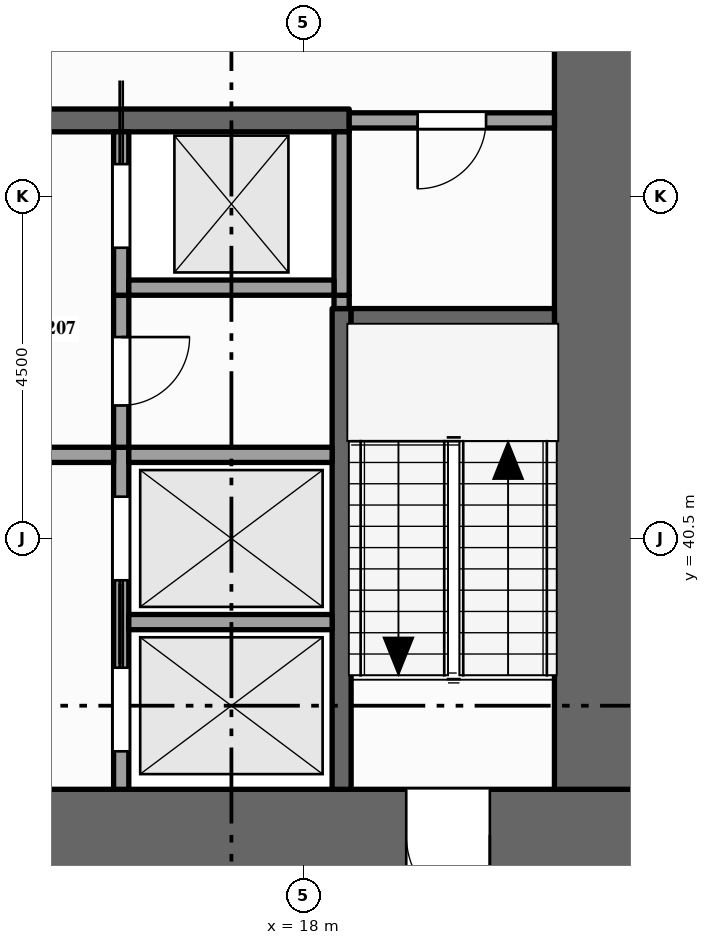
"""IFC4 building model, lengths in metres.
Left out: names, types, materials, properties, quantities, classifications, styles, units other than length and angle.
Written with IfcOpenShell. Run it as: python <this file> out.ifc"""

import sys

from ifc_helpers import new_model, si_unit, direction, frame, frame_2d, origin, place, context, subcontext, project, spatial, rectangle, extrude, element, fill, save


model = new_model("IFC4")
c1 = context("Model", 3, precision=1e-05, world=origin(), true_north=direction((0.0, 1.0)))
c2 = subcontext(c1, "Body", "Model", "MODEL_VIEW")
j1 = project(units=[si_unit("LENGTHUNIT", "METRE"), si_unit("PLANEANGLEUNIT", "RADIAN")], contexts=[c1])
p1 = place(None, origin())
s1 = spatial("IfcSite", under=j1, at=p1, CompositionType="ELEMENT")
p2 = place(p1, origin())
s2 = spatial("IfcBuilding", under=s1, at=p2, CompositionType="ELEMENT")
p3 = place(p2, frame((0.0, 0.0, 33.0)))
s3 = spatial("IfcBuildingStorey", under=s2, at=p3, CompositionType="ELEMENT", Elevation=33.0)
p4 = place(p3, frame((0.0, 36.6, -0.15), z_axis=(0.0, 0.0, 1.0), x_axis=(1.0, 0.0, 0.0)))
e1 = element("IfcWall", 1, at=p4, inside=s3, PredefinedType="SHEAR", context=c2, shape_type="SweptSolid", body=[
    extrude(rectangle(XDim=22.5, YDim=1.2, at=frame_2d((11.25, 0.0))), origin(), (0.0, 0.0, 1.0), 4.0),
])
p5 = place(p4, frame((7.1, 0.0, 0.15)))
e2 = element("IfcOpeningElement", 2, at=p5, cuts=e1, PredefinedType="OPENING", context=c2, shape_type="SweptSolid", body=[
    extrude(rectangle(XDim=1.8, YDim=2.1, at=frame_2d((0.9, 1.05))), frame((0.0, 0.61, 0.0), z_axis=(0.0, -1.0, 0.0), x_axis=(1.0, 0.0, 0.0)), (0.0, 0.0, 1.0), 1.22),
])
p6 = place(p4, frame((13.15, 0.0, 0.15)))
e3 = element("IfcOpeningElement", 3, at=p6, cuts=e1, PredefinedType="OPENING", context=c2, shape_type="SweptSolid", body=[
    extrude(rectangle(XDim=1.1, YDim=2.1, at=frame_2d((0.55, 1.05))), frame((0.0, 0.61, 0.0), z_axis=(0.0, -1.0, 0.0), x_axis=(1.0, 0.0, 0.0)), (0.0, 0.0, 1.0), 1.22),
])
p7 = place(p4, frame((2.15, 0.0, 0.15)))
e4 = element("IfcOpeningElement", 4, at=p7, cuts=e1, PredefinedType="OPENING", context=c2, shape_type="SweptSolid", body=[
    extrude(rectangle(XDim=1.1, YDim=2.1, at=frame_2d((0.55, 1.05))), frame((0.0, 0.61, 0.0), z_axis=(0.0, -1.0, 0.0), x_axis=(1.0, 0.0, 0.0)), (0.0, 0.0, 1.0), 1.22),
])
p8 = place(p4, frame((19.35, 0.0, 0.15)))
e5 = element("IfcOpeningElement", 5, at=p8, cuts=e1, PredefinedType="OPENING", context=c2, shape_type="SweptSolid", body=[
    extrude(rectangle(XDim=1.1, YDim=2.1, at=frame_2d((0.55, 1.05))), frame((0.0, 0.61, 0.0), z_axis=(0.0, -1.0, 0.0), x_axis=(1.0, 0.0, 0.0)), (0.0, 0.0, 1.0), 1.22),
])
p9 = place(p3, frame((21.9, 37.2, -0.15), z_axis=(0.0, 0.0, 1.0), x_axis=(0.0, 1.0, 0.0)))
e6 = element("IfcWall", 6, at=p9, inside=s3, PredefinedType="SHEAR", context=c2, shape_type="SweptSolid", body=[
    extrude(rectangle(XDim=11.1, YDim=1.2, at=frame_2d((5.55, 0.0))), origin(), (0.0, 0.0, 1.0), 4.0),
])
p10 = place(p3, frame((15.6, 37.2, 0.0), z_axis=(0.0, 0.0, 1.0), x_axis=(0.0, 1.0, 0.0)))
e7 = element("IfcWall", 7, at=p10, inside=s3, PredefinedType="SOLIDWALL", context=c2, shape_type="SweptSolid", body=[
    extrude(rectangle(XDim=4.5, YDim=0.2, at=frame_2d((2.25, 0.0))), origin(), (0.0, 0.0, 1.0), 3.85),
])
p11 = place(p10, frame((0.5, 0.0, 0.012)))
e8 = element("IfcOpeningElement", 8, at=p11, cuts=e7, PredefinedType="OPENING", context=c2, shape_type="SweptSolid", body=[
    extrude(rectangle(XDim=1.1, YDim=2.1, at=frame_2d((0.55, 1.05))), frame((0.0, 0.11, 0.0), z_axis=(0.0, -1.0, 0.0), x_axis=(1.0, 0.0, 0.0)), (0.0, 0.0, 1.0), 0.22),
])
p12 = place(p10, frame((2.75, 0.0, 0.012)))
e9 = element("IfcOpeningElement", 9, at=p12, cuts=e7, PredefinedType="OPENING", context=c2, shape_type="SweptSolid", body=[
    extrude(rectangle(XDim=1.1, YDim=2.1, at=frame_2d((0.55, 1.05))), frame((0.0, 0.11, 0.0), z_axis=(0.0, -1.0, 0.0), x_axis=(1.0, 0.0, 0.0)), (0.0, 0.0, 1.0), 0.22),
])
p13 = place(p3, frame((15.6, 41.7, 0.0), z_axis=(0.0, 0.0, 1.0), x_axis=(0.0, 1.0, 0.0)))
e10 = element("IfcWall", 10, at=p13, inside=s3, PredefinedType="PARTITIONING", context=c2, shape_type="SweptSolid", body=[
    extrude(rectangle(XDim=2.0, YDim=0.2, at=frame_2d((1.0, 0.0))), origin(), (0.0, 0.0, 1.0), 3.85),
])
p14 = place(p13, frame((0.55, 0.0, 0.0)))
e11 = element("IfcOpeningElement", 11, at=p14, cuts=e10, PredefinedType="OPENING", context=c2, shape_type="SweptSolid", body=[
    extrude(rectangle(XDim=0.9, YDim=2.1, at=frame_2d((0.45, 1.05))), frame((0.0, 0.11, 0.0), z_axis=(0.0, -1.0, 0.0), x_axis=(1.0, 0.0, 0.0)), (0.0, 0.0, 1.0), 0.22),
])
p15 = place(p3, frame((15.6, 43.7, 0.0), z_axis=(0.0, 0.0, 1.0), x_axis=(0.0, 1.0, 0.0)))
e12 = element("IfcWall", 12, at=p15, inside=s3, PredefinedType="SOLIDWALL", context=c2, shape_type="SweptSolid", body=[
    extrude(rectangle(XDim=2.15, YDim=0.2, at=frame_2d((1.075, 0.0))), origin(), (0.0, 0.0, 1.0), 3.85),
])
p16 = place(p15, frame((0.625, 0.0, 0.012)))
e13 = element("IfcOpeningElement", 13, at=p16, cuts=e12, PredefinedType="OPENING", context=c2, shape_type="SweptSolid", body=[
    extrude(rectangle(XDim=1.1, YDim=2.1, at=frame_2d((0.55, 1.05))), frame((0.0, 0.11, 0.0), z_axis=(0.0, -1.0, 0.0), x_axis=(1.0, 0.0, 0.0)), (0.0, 0.0, 1.0), 0.22),
])
p17 = place(p3, frame((18.5, 37.2, 0.0), z_axis=(0.0, 0.0, 1.0), x_axis=(0.0, 1.0, 0.0)))
e14 = element("IfcWall", 14, at=p17, inside=s3, PredefinedType="SHEAR", context=c2, shape_type="SweptSolid", body=[
    extrude(rectangle(XDim=6.325, YDim=0.25, at=frame_2d((3.163, 0.0))), origin(), (0.0, 0.0, 1.0), 3.85),
])
p18 = place(p3, frame((18.5, 43.525, 0.0), z_axis=(0.0, 0.0, 1.0), x_axis=(0.0, 1.0, 0.0)))
e15 = element("IfcWall", 15, at=p18, inside=s3, PredefinedType="PARTITIONING", context=c2, shape_type="SweptSolid", body=[
    extrude(rectangle(XDim=0.175, YDim=0.2, at=frame_2d((0.087, 0.0))), origin(), (0.0, 0.0, 1.0), 3.85),
])
p19 = place(p3, frame((18.5, 43.7, 0.0), z_axis=(0.0, 0.0, 1.0), x_axis=(0.0, 1.0, 0.0)))
e16 = element("IfcWall", 16, at=p19, inside=s3, PredefinedType="SOLIDWALL", context=c2, shape_type="SweptSolid", body=[
    extrude(rectangle(XDim=2.15, YDim=0.2, at=frame_2d((1.075, 0.0))), origin(), (0.0, 0.0, 1.0), 3.85),
])
p20 = place(p3, frame((15.7, 39.4, 0.0), z_axis=(0.0, 0.0, 1.0), x_axis=(1.0, 0.0, 0.0)))
e17 = element("IfcWall", 17, at=p20, inside=s3, PredefinedType="SOLIDWALL", context=c2, shape_type="SweptSolid", body=[
    extrude(rectangle(XDim=2.675, YDim=0.2, at=frame_2d((1.337, 0.0))), origin(), (0.0, 0.0, 1.0), 3.85),
])
p21 = place(p3, frame((11.9, 41.6, 0.0), z_axis=(0.0, 0.0, 1.0), x_axis=(1.0, 0.0, 0.0)))
e18 = element("IfcWall", 18, at=p21, inside=s3, PredefinedType="PARTITIONING", context=c2, shape_type="SweptSolid", body=[
    extrude(rectangle(XDim=3.6, YDim=0.2, at=frame_2d((1.8, 0.0))), origin(), (0.0, 0.0, 1.0), 3.85),
])
p22 = place(p21, frame((1.3, 0.0, 0.0)))
e19 = element("IfcOpeningElement", 19, at=p22, cuts=e18, PredefinedType="OPENING", context=c2, shape_type="SweptSolid", body=[
    extrude(rectangle(XDim=1.0, YDim=2.1, at=frame_2d((0.5, 1.05))), frame((0.0, 0.11, 0.0), z_axis=(0.0, -1.0, 0.0), x_axis=(1.0, 0.0, 0.0)), (0.0, 0.0, 1.0), 0.22),
])
p23 = place(p3, frame((15.7, 41.6, 0.0), z_axis=(0.0, 0.0, 1.0), x_axis=(1.0, 0.0, 0.0)))
e20 = element("IfcWall", 20, at=p23, inside=s3, PredefinedType="SOLIDWALL", context=c2, shape_type="SweptSolid", body=[
    extrude(rectangle(XDim=2.675, YDim=0.2, at=frame_2d((1.337, 0.0))), origin(), (0.0, 0.0, 1.0), 3.85),
])
p24 = place(p3, frame((18.625, 43.4, 0.0), z_axis=(0.0, 0.0, 1.0), x_axis=(1.0, 0.0, 0.0)))
e21 = element("IfcWall", 21, at=p24, inside=s3, PredefinedType="SHEAR", context=c2, shape_type="SweptSolid", body=[
    extrude(rectangle(XDim=2.675, YDim=0.25, at=frame_2d((1.337, 0.0))), origin(), (0.0, 0.0, 1.0), 3.85),
])
p25 = place(p3, frame((15.7, 43.8, 0.0), z_axis=(0.0, 0.0, 1.0), x_axis=(1.0, 0.0, 0.0)))
e22 = element("IfcWall", 22, at=p25, inside=s3, PredefinedType="SOLIDWALL", context=c2, shape_type="SweptSolid", body=[
    extrude(rectangle(XDim=2.7, YDim=0.2, at=frame_2d((1.35, 0.0))), origin(), (0.0, 0.0, 1.0), 3.85),
])
p26 = place(p3, frame((4.1, 46.0, 0.0), z_axis=(0.0, 0.0, 1.0), x_axis=(1.0, 0.0, 0.0)))
e23 = element("IfcWall", 23, at=p26, inside=s3, PredefinedType="SHEAR", context=c2, shape_type="SweptSolid", body=[
    extrude(rectangle(XDim=14.5, YDim=0.3, at=frame_2d((7.25, 0.0))), origin(), (0.0, 0.0, 1.0), 3.85),
])
p27 = place(p26, frame((3.4, 0.0, 0.0)))
e24 = element("IfcOpeningElement", 24, at=p27, cuts=e23, PredefinedType="OPENING", context=c2, shape_type="SweptSolid", body=[
    extrude(rectangle(XDim=1.0, YDim=2.1, at=frame_2d((0.5, 1.05))), frame((0.0, 0.16, 0.0), z_axis=(0.0, -1.0, 0.0), x_axis=(1.0, 0.0, 0.0)), (0.0, 0.0, 1.0), 0.32),
])
p28 = place(p26, frame((9.1, 0.0, 0.0)))
e25 = element("IfcOpeningElement", 25, at=p28, cuts=e23, PredefinedType="OPENING", context=c2, shape_type="SweptSolid", body=[
    extrude(rectangle(XDim=1.0, YDim=2.1, at=frame_2d((0.5, 1.05))), frame((0.0, 0.16, 0.0), z_axis=(0.0, -1.0, 0.0), x_axis=(1.0, 0.0, 0.0)), (0.0, 0.0, 1.0), 0.32),
])
p29 = place(p3, frame((18.6, 46.0, 0.0), z_axis=(0.0, 0.0, 1.0), x_axis=(1.0, 0.0, 0.0)))
e26 = element("IfcWall", 26, at=p29, inside=s3, PredefinedType="PARTITIONING", context=c2, shape_type="SweptSolid", body=[
    extrude(rectangle(XDim=2.7, YDim=0.2, at=frame_2d((1.35, 0.0))), origin(), (0.0, 0.0, 1.0), 3.85),
])
p30 = place(p29, frame((0.9, 0.0, 0.0)))
e27 = element("IfcOpeningElement", 27, at=p30, cuts=e26, PredefinedType="OPENING", context=c2, shape_type="SweptSolid", body=[
    extrude(rectangle(XDim=0.9, YDim=2.1, at=frame_2d((0.45, 1.05))), frame((0.0, 0.11, 0.0), z_axis=(0.0, -1.0, 0.0), x_axis=(1.0, 0.0, 0.0)), (0.0, 0.0, 1.0), 0.22),
])
p31 = place(p11, origin())
e28 = element("IfcDoor", 28, at=p31, inside=s3, OperationType="SLIDING_TO_RIGHT", PredefinedType="DOOR", context=c2, shape_type="SweptSolid", body=[
    extrude(rectangle(XDim=1.1, YDim=2.1, at=frame_2d((0.55, 1.05))), frame((0.0, 0.025, 0.0), z_axis=(0.0, -1.0, 0.0), x_axis=(1.0, 0.0, 0.0)), (0.0, 0.0, 1.0), 0.05),
])
fill(e8, e28)
p32 = place(p12, origin())
e29 = element("IfcDoor", 29, at=p32, inside=s3, OperationType="SLIDING_TO_LEFT", PredefinedType="DOOR", context=c2, shape_type="SweptSolid", body=[
    extrude(rectangle(XDim=1.1, YDim=2.1, at=frame_2d((0.55, 1.05))), frame((0.0, 0.025, 0.0), z_axis=(0.0, -1.0, 0.0), x_axis=(1.0, 0.0, 0.0)), (0.0, 0.0, 1.0), 0.05),
])
fill(e9, e29)
p33 = place(p16, origin())
e30 = element("IfcDoor", 30, at=p33, inside=s3, OperationType="SLIDING_TO_RIGHT", PredefinedType="DOOR", context=c2, shape_type="SweptSolid", body=[
    extrude(rectangle(XDim=1.1, YDim=2.1, at=frame_2d((0.55, 1.05))), frame((0.0, 0.025, 0.0), z_axis=(0.0, -1.0, 0.0), x_axis=(1.0, 0.0, 0.0)), (0.0, 0.0, 1.0), 0.05),
])
fill(e13, e30)
p34 = place(p8, origin())
e31 = element("IfcDoor", 31, at=p34, inside=s3, OperationType="SINGLE_SWING_RIGHT", PredefinedType="DOOR", context=c2, shape_type="SweptSolid", body=[
    extrude(rectangle(XDim=1.1, YDim=2.1, at=frame_2d((0.55, 1.05))), frame((0.0, 0.025, 0.0), z_axis=(0.0, -1.0, 0.0), x_axis=(1.0, 0.0, 0.0)), (0.0, 0.0, 1.0), 0.05),
])
fill(e5, e31)
p35 = place(p30, origin())
e32 = element("IfcDoor", 32, at=p35, inside=s3, OperationType="SINGLE_SWING_LEFT", PredefinedType="DOOR", context=c2, shape_type="SweptSolid", body=[
    extrude(rectangle(XDim=0.9, YDim=2.1, at=frame_2d((0.45, 1.05))), frame((0.0, 0.025, 0.0), z_axis=(0.0, -1.0, 0.0), x_axis=(1.0, 0.0, 0.0)), (0.0, 0.0, 1.0), 0.05),
])
fill(e27, e32)
p36 = place(p14, origin())
e33 = element("IfcDoor", 33, at=p36, inside=s3, OperationType="SINGLE_SWING_RIGHT", PredefinedType="DOOR", context=c2, shape_type="SweptSolid", body=[
    extrude(rectangle(XDim=0.9, YDim=2.1, at=frame_2d((0.45, 1.05))), frame((0.0, 0.025, 0.0), z_axis=(0.0, -1.0, 0.0), x_axis=(1.0, 0.0, 0.0)), (0.0, 0.0, 1.0), 0.05),
])
fill(e11, e33)
save(model, sys.argv[1])
